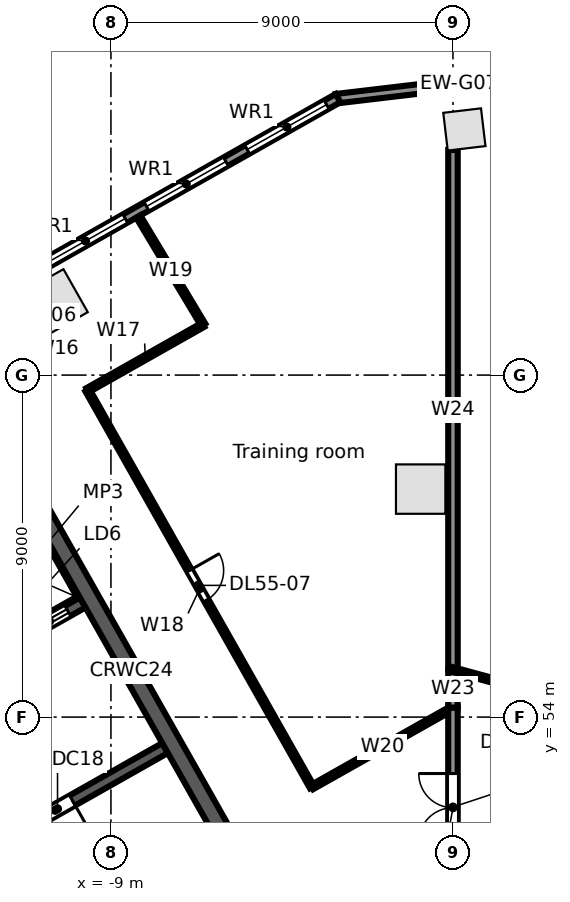
"""IFC4 building model, lengths in metres.
Left out: names, types, materials, properties, quantities, classifications, styles, units other than length and angle.
Written with IfcOpenShell. Run it as: python <this file> out.ifc"""

import sys

from ifc_helpers import new_model, si_unit, direction, frame, frame_2d, origin, origin_2d, place, context, subcontext, project, spatial, rectangle, extrude, element, fill, save


model = new_model("IFC4")
c1 = context("Model", 3, precision=1e-05, world=origin(), true_north=direction((0.0, 1.0)))
c2 = subcontext(c1, "Body", "Model", "MODEL_VIEW")
j1 = project(units=[si_unit("LENGTHUNIT", "METRE"), si_unit("PLANEANGLEUNIT", "RADIAN")], contexts=[c1])
p1 = place(None, origin())
s1 = spatial("IfcSite", under=j1, at=p1, CompositionType="ELEMENT")
p2 = place(p1, origin())
s2 = spatial("IfcBuilding", under=s1, at=p2, CompositionType="ELEMENT")
p3 = place(p2, frame((0.0, 0.0, 254.3)))
s3 = spatial("IfcBuildingStorey", under=s2, at=p3, CompositionType="ELEMENT", Elevation=254.3)
p4 = place(p3, frame((0.3, 69.464, 0.0), z_axis=(0.0, 0.0, 1.0), x_axis=(-0.993068456955, -0.117537397458, 0.0)))
e1 = element("IfcColumn", 1, at=p4, inside=s3, PredefinedType="COLUMN", context=c2, shape_type="SweptSolid", body=[
    extrude(rectangle(XDim=1.0, YDim=1.0, at=origin_2d()), origin(), (0.0, 0.0, 1.0), 3.9),
])
for number, where, z_axis, x_axis in (
    (2, (-10.495, 64.902, 0.0), (0.0, 0.0, 1.0), (-0.87, -0.492, 0.0)),
    (3, (-0.85, 60.0, 0.0), (0.0, 0.0, 1.0), (0.0, 1.0, 0.0)),
):
    element("IfcColumn", number, at=place(p3, frame(where, z_axis=z_axis, x_axis=x_axis)), inside=s3, PredefinedType="COLUMN", context=c2, shape_type="SweptSolid", body=[
        extrude(rectangle(XDim=1.3, YDim=1.3, at=origin_2d()), origin(), (0.0, 0.0, 1.0), 3.9),
    ])
p5 = place(p3, frame((-3.071, 70.273, 0.0), z_axis=(0.0, 0.0, 1.0), x_axis=(0.993064524962, 0.11757061394, 0.0)))
e4 = element("IfcWall", 4, at=p5, inside=s3, PredefinedType="STANDARD", context=c2, shape_type="SweptSolid", body=[
    extrude(rectangle(XDim=6.506, YDim=0.25, at=frame_2d((3.253, 0.0))), origin(), (0.0, 0.0, 1.0), 3.55),
])
p6 = place(p3, frame((-58.732, 38.771, 0.0), z_axis=(0.0, 0.0, 1.0), x_axis=(0.870354824205, 0.492425100887, 0.0)))
e5 = element("IfcWall", 5, at=p6, inside=s3, PredefinedType="STANDARD", context=c2, shape_type="SweptSolid", body=[
    extrude(rectangle(XDim=64.006, YDim=0.25, at=frame_2d((32.003, 0.0))), origin(), (0.0, 0.0, 1.0), 3.55),
])
p7 = place(p6, frame((61.259, 0.0, 0.8)))
e6 = element("IfcOpeningElement", 6, at=p7, cuts=e5, PredefinedType="OPENING", context=c2, shape_type="SweptSolid", body=[
    extrude(rectangle(XDim=2.4, YDim=2.2, at=frame_2d((1.2, 1.1))), frame((0.0, 0.135, 0.0), z_axis=(0.0, -1.0, 0.0), x_axis=(1.0, 0.0, 0.0)), (0.0, 0.0, 1.0), 0.27),
])
p8 = place(p6, frame((58.216, 0.0, 0.8)))
e7 = element("IfcOpeningElement", 7, at=p8, cuts=e5, PredefinedType="OPENING", context=c2, shape_type="SweptSolid", body=[
    extrude(rectangle(XDim=2.4, YDim=2.2, at=frame_2d((1.2, 1.1))), frame((0.0, 0.135, 0.0), z_axis=(0.0, -1.0, 0.0), x_axis=(1.0, 0.0, 0.0)), (0.0, 0.0, 1.0), 0.27),
])
p9 = place(p6, frame((55.173, 0.0, 0.8)))
e8 = element("IfcOpeningElement", 8, at=p9, cuts=e5, PredefinedType="OPENING", context=c2, shape_type="SweptSolid", body=[
    extrude(rectangle(XDim=2.4, YDim=2.2, at=frame_2d((1.2, 1.1))), frame((0.0, 0.135, 0.0), z_axis=(0.0, -1.0, 0.0), x_axis=(1.0, 0.0, 0.0)), (0.0, 0.0, 1.0), 0.27),
])
p10 = place(p6, frame((52.129, 0.0, 0.8)))
e9 = element("IfcOpeningElement", 9, at=p10, cuts=e5, PredefinedType="OPENING", context=c2, shape_type="SweptSolid", body=[
    extrude(rectangle(XDim=2.4, YDim=2.2, at=frame_2d((1.2, 1.1))), frame((0.0, 0.135, 0.0), z_axis=(0.0, -1.0, 0.0), x_axis=(1.0, 0.0, 0.0)), (0.0, 0.0, 1.0), 0.27),
])
p11 = place(p6, frame((49.086, 0.0, 0.8)))
e10 = element("IfcOpeningElement", 10, at=p11, cuts=e5, PredefinedType="OPENING", context=c2, shape_type="SweptSolid", body=[
    extrude(rectangle(XDim=2.4, YDim=2.2, at=frame_2d((1.2, 1.1))), frame((0.0, 0.135, 0.0), z_axis=(0.0, -1.0, 0.0), x_axis=(1.0, 0.0, 0.0)), (0.0, 0.0, 1.0), 0.27),
])
p12 = place(p6, frame((46.043, 0.0, 0.8)))
e11 = element("IfcOpeningElement", 11, at=p12, cuts=e5, PredefinedType="OPENING", context=c2, shape_type="SweptSolid", body=[
    extrude(rectangle(XDim=2.4, YDim=2.2, at=frame_2d((1.2, 1.1))), frame((0.0, 0.135, 0.0), z_axis=(0.0, -1.0, 0.0), x_axis=(1.0, 0.0, 0.0)), (0.0, 0.0, 1.0), 0.27),
])
p13 = place(p6, frame((43.0, 0.0, 0.8)))
e12 = element("IfcOpeningElement", 12, at=p13, cuts=e5, PredefinedType="OPENING", context=c2, shape_type="SweptSolid", body=[
    extrude(rectangle(XDim=2.4, YDim=2.2, at=frame_2d((1.2, 1.1))), frame((0.0, 0.135, 0.0), z_axis=(0.0, -1.0, 0.0), x_axis=(1.0, 0.0, 0.0)), (0.0, 0.0, 1.0), 0.27),
])
p14 = place(p6, frame((39.956, 0.0, 0.8)))
e13 = element("IfcOpeningElement", 13, at=p14, cuts=e5, PredefinedType="OPENING", context=c2, shape_type="SweptSolid", body=[
    extrude(rectangle(XDim=2.4, YDim=2.2, at=frame_2d((1.2, 1.1))), frame((0.0, 0.135, 0.0), z_axis=(0.0, -1.0, 0.0), x_axis=(1.0, 0.0, 0.0)), (0.0, 0.0, 1.0), 0.27),
])
p15 = place(p6, frame((36.913, 0.0, 0.8)))
e14 = element("IfcOpeningElement", 14, at=p15, cuts=e5, PredefinedType="OPENING", context=c2, shape_type="SweptSolid", body=[
    extrude(rectangle(XDim=2.4, YDim=2.2, at=frame_2d((1.2, 1.1))), frame((0.0, 0.135, 0.0), z_axis=(0.0, -1.0, 0.0), x_axis=(1.0, 0.0, 0.0)), (0.0, 0.0, 1.0), 0.27),
])
p16 = place(p6, frame((33.87, 0.0, 0.8)))
e15 = element("IfcOpeningElement", 15, at=p16, cuts=e5, PredefinedType="OPENING", context=c2, shape_type="SweptSolid", body=[
    extrude(rectangle(XDim=2.4, YDim=2.2, at=frame_2d((1.2, 1.1))), frame((0.0, 0.135, 0.0), z_axis=(0.0, -1.0, 0.0), x_axis=(1.0, 0.0, 0.0)), (0.0, 0.0, 1.0), 0.27),
])
p17 = place(p6, frame((30.826, 0.0, 0.8)))
e16 = element("IfcOpeningElement", 16, at=p17, cuts=e5, PredefinedType="OPENING", context=c2, shape_type="SweptSolid", body=[
    extrude(rectangle(XDim=2.4, YDim=2.2, at=frame_2d((1.2, 1.1))), frame((0.0, 0.135, 0.0), z_axis=(0.0, -1.0, 0.0), x_axis=(1.0, 0.0, 0.0)), (0.0, 0.0, 1.0), 0.27),
])
p18 = place(p6, frame((27.783, 0.0, 0.8)))
e17 = element("IfcOpeningElement", 17, at=p18, cuts=e5, PredefinedType="OPENING", context=c2, shape_type="SweptSolid", body=[
    extrude(rectangle(XDim=2.4, YDim=2.2, at=frame_2d((1.2, 1.1))), frame((0.0, 0.135, 0.0), z_axis=(0.0, -1.0, 0.0), x_axis=(1.0, 0.0, 0.0)), (0.0, 0.0, 1.0), 0.27),
])
p19 = place(p6, frame((24.74, 0.0, 0.8)))
e18 = element("IfcOpeningElement", 18, at=p19, cuts=e5, PredefinedType="OPENING", context=c2, shape_type="SweptSolid", body=[
    extrude(rectangle(XDim=2.4, YDim=2.2, at=frame_2d((1.2, 1.1))), frame((0.0, 0.135, 0.0), z_axis=(0.0, -1.0, 0.0), x_axis=(1.0, 0.0, 0.0)), (0.0, 0.0, 1.0), 0.27),
])
p20 = place(p6, frame((21.696, 0.0, 0.8)))
e19 = element("IfcOpeningElement", 19, at=p20, cuts=e5, PredefinedType="OPENING", context=c2, shape_type="SweptSolid", body=[
    extrude(rectangle(XDim=2.4, YDim=2.2, at=frame_2d((1.2, 1.1))), frame((0.0, 0.135, 0.0), z_axis=(0.0, -1.0, 0.0), x_axis=(1.0, 0.0, 0.0)), (0.0, 0.0, 1.0), 0.27),
])
p21 = place(p6, frame((18.653, 0.0, 0.8)))
e20 = element("IfcOpeningElement", 20, at=p21, cuts=e5, PredefinedType="OPENING", context=c2, shape_type="SweptSolid", body=[
    extrude(rectangle(XDim=2.4, YDim=2.2, at=frame_2d((1.2, 1.1))), frame((0.0, 0.135, 0.0), z_axis=(0.0, -1.0, 0.0), x_axis=(1.0, 0.0, 0.0)), (0.0, 0.0, 1.0), 0.27),
])
p22 = place(p6, frame((15.61, 0.0, 0.8)))
e21 = element("IfcOpeningElement", 21, at=p22, cuts=e5, PredefinedType="OPENING", context=c2, shape_type="SweptSolid", body=[
    extrude(rectangle(XDim=2.4, YDim=2.2, at=frame_2d((1.2, 1.1))), frame((0.0, 0.135, 0.0), z_axis=(0.0, -1.0, 0.0), x_axis=(1.0, 0.0, 0.0)), (0.0, 0.0, 1.0), 0.27),
])
p23 = place(p6, frame((12.567, 0.0, 0.8)))
e22 = element("IfcOpeningElement", 22, at=p23, cuts=e5, PredefinedType="OPENING", context=c2, shape_type="SweptSolid", body=[
    extrude(rectangle(XDim=2.4, YDim=2.2, at=frame_2d((1.2, 1.1))), frame((0.0, 0.135, 0.0), z_axis=(0.0, -1.0, 0.0), x_axis=(1.0, 0.0, 0.0)), (0.0, 0.0, 1.0), 0.27),
])
p24 = place(p6, frame((9.523, 0.0, 0.8)))
e23 = element("IfcOpeningElement", 23, at=p24, cuts=e5, PredefinedType="OPENING", context=c2, shape_type="SweptSolid", body=[
    extrude(rectangle(XDim=2.4, YDim=2.2, at=frame_2d((1.2, 1.1))), frame((0.0, 0.135, 0.0), z_axis=(0.0, -1.0, 0.0), x_axis=(1.0, 0.0, 0.0)), (0.0, 0.0, 1.0), 0.27),
])
p25 = place(p6, frame((6.48, 0.0, 0.8)))
e24 = element("IfcOpeningElement", 24, at=p25, cuts=e5, PredefinedType="OPENING", context=c2, shape_type="SweptSolid", body=[
    extrude(rectangle(XDim=2.4, YDim=2.2, at=frame_2d((1.2, 1.1))), frame((0.0, 0.135, 0.0), z_axis=(0.0, -1.0, 0.0), x_axis=(1.0, 0.0, 0.0)), (0.0, 0.0, 1.0), 0.27),
])
p26 = place(p6, frame((3.437, 0.0, 0.8)))
e25 = element("IfcOpeningElement", 25, at=p26, cuts=e5, PredefinedType="OPENING", context=c2, shape_type="SweptSolid", body=[
    extrude(rectangle(XDim=2.4, YDim=2.2, at=frame_2d((1.2, 1.1))), frame((0.0, 0.135, 0.0), z_axis=(0.0, -1.0, 0.0), x_axis=(1.0, 0.0, 0.0)), (0.0, 0.0, 1.0), 0.27),
])
p27 = place(p6, frame((0.393, 0.0, 0.8)))
e26 = element("IfcOpeningElement", 26, at=p27, cuts=e5, PredefinedType="OPENING", context=c2, shape_type="SweptSolid", body=[
    extrude(rectangle(XDim=2.4, YDim=2.2, at=frame_2d((1.2, 1.1))), frame((0.0, 0.135, 0.0), z_axis=(0.0, -1.0, 0.0), x_axis=(1.0, 0.0, 0.0)), (0.0, 0.0, 1.0), 0.27),
])
p28 = place(p3, frame((-13.365, 49.911, 0.0), z_axis=(0.0, 0.0, 1.0), x_axis=(0.870352159619, 0.492429810477, 0.0)))
e27 = element("IfcWall", 27, at=p28, inside=s3, PredefinedType="SOLIDWALL", context=c2, shape_type="SweptSolid", body=[
    extrude(rectangle(XDim=6.65, YDim=0.3, at=frame_2d((3.325, 0.0))), origin(), (0.0, 0.0, 1.0), 3.55),
])
p29 = place(p28, frame((2.95, 0.0, 0.0)))
e28 = element("IfcOpeningElement", 28, at=p29, cuts=e27, PredefinedType="OPENING", context=c2, shape_type="SweptSolid", body=[
    extrude(rectangle(XDim=0.9, YDim=2.1, at=frame_2d((0.45, 1.05))), frame((0.0, 0.16, 0.0), z_axis=(0.0, -1.0, 0.0), x_axis=(1.0, 0.0, 0.0)), (0.0, 0.0, 1.0), 0.32),
])
p30 = place(p3, frame((-15.618, 53.691, 0.0), z_axis=(0.0, 0.0, 1.0), x_axis=(0.870358646884, 0.492418344291, 0.0)))
e29 = element("IfcWall", 29, at=p30, inside=s3, PredefinedType="SOLIDWALL", context=c2, shape_type="SweptSolid", body=[
    extrude(rectangle(XDim=6.75, YDim=0.3, at=frame_2d((3.375, 0.0))), origin(), (0.0, 0.0, 1.0), 3.55),
])
p31 = place(p30, frame((0.6, 0.0, 0.0)))
e30 = element("IfcOpeningElement", 30, at=p31, cuts=e29, PredefinedType="OPENING", context=c2, shape_type="SweptSolid", body=[
    extrude(rectangle(XDim=1.1, YDim=2.1, at=frame_2d((0.55, 1.05))), frame((0.0, 0.16, 0.0), z_axis=(0.0, -1.0, 0.0), x_axis=(1.0, 0.0, 0.0)), (0.0, 0.0, 1.0), 0.32),
])
p32 = place(p30, frame((2.9, 0.0, 0.0)))
e31 = element("IfcOpeningElement", 31, at=p32, cuts=e29, PredefinedType="OPENING", context=c2, shape_type="SweptSolid", body=[
    extrude(rectangle(XDim=1.1, YDim=2.1, at=frame_2d((0.55, 1.05))), frame((0.0, 0.16, 0.0), z_axis=(0.0, -1.0, 0.0), x_axis=(1.0, 0.0, 0.0)), (0.0, 0.0, 1.0), 0.32),
])
p33 = place(p30, frame((5.2, 0.0, 0.0)))
e32 = element("IfcOpeningElement", 32, at=p33, cuts=e29, PredefinedType="OPENING", context=c2, shape_type="SweptSolid", body=[
    extrude(rectangle(XDim=1.1, YDim=2.1, at=frame_2d((0.55, 1.05))), frame((0.0, 0.16, 0.0), z_axis=(0.0, -1.0, 0.0), x_axis=(1.0, 0.0, 0.0)), (0.0, 0.0, 1.0), 0.32),
])
p34 = place(p3, frame((-11.689, 60.912, 0.0), z_axis=(0.0, 0.0, 1.0), x_axis=(0.492421378713, -0.870356930107, 0.0)))
e33 = element("IfcWall", 33, at=p34, inside=s3, PredefinedType="SOLIDWALL", context=c2, shape_type="SweptSolid", body=[
    extrude(rectangle(XDim=13.1, YDim=0.45, at=frame_2d((6.55, 0.0))), origin(), (0.0, 0.0, 1.0), 3.55),
])
p35 = place(p3, frame((-9.618, 62.601, 0.0), z_axis=(0.0, 0.0, 1.0), x_axis=(0.870402970255, 0.492339993675, 0.0)))
e34 = element("IfcWall", 34, at=p35, inside=s3, PredefinedType="PARTITIONING", context=c2, shape_type="SweptSolid", body=[
    extrude(rectangle(XDim=3.5, YDim=0.125, at=frame_2d((1.75, 0.0))), origin(), (0.0, 0.0, 1.0), 2.722),
])
p36 = place(p3, frame((-9.618, 62.601, 0.0), z_axis=(0.0, 0.0, 1.0), x_axis=(0.492420575123, -0.870357384754, 0.0)))
e35 = element("IfcWall", 35, at=p36, inside=s3, PredefinedType="PARTITIONING", context=c2, shape_type="SweptSolid", body=[
    extrude(rectangle(XDim=12.0, YDim=0.125, at=frame_2d((6.0, 0.0))), origin(), (0.0, 0.0, 1.0), 2.722),
])
p37 = place(p36, frame((5.45, 0.0, 0.0)))
e36 = element("IfcOpeningElement", 36, at=p37, cuts=e35, PredefinedType="OPENING", context=c2, shape_type="SweptSolid", body=[
    extrude(rectangle(XDim=0.9, YDim=2.1, at=frame_2d((0.45, 1.05))), frame((0.0, 0.073, 0.0), z_axis=(0.0, -1.0, 0.0), x_axis=(1.0, 0.0, 0.0)), (0.0, 0.0, 1.0), 0.145),
])
p38 = place(p3, frame((-8.28, 67.172, 0.0), z_axis=(0.0, 0.0, 1.0), x_axis=(0.514301147355, -0.857609660527, 0.0)))
e37 = element("IfcWall", 37, at=p38, inside=s3, PredefinedType="PARTITIONING", context=c2, shape_type="SweptSolid", body=[
    extrude(rectangle(XDim=3.321, YDim=0.125, at=frame_2d((1.661, 0.0))), origin(), (0.0, 0.0, 1.0), 2.73),
])
p39 = place(p3, frame((-3.709, 52.157, 0.0), z_axis=(0.0, 0.0, 1.0), x_axis=(0.870901087888, 0.491458335075, 0.0)))
e38 = element("IfcWall", 38, at=p39, inside=s3, PredefinedType="PARTITIONING", context=c2, shape_type="SweptSolid", body=[
    extrude(rectangle(XDim=4.259, YDim=0.125, at=frame_2d((2.129, 0.0))), origin(), (0.0, 0.0, 1.0), 2.722),
])
p40 = place(p3, frame((0.0, 49.015, 0.0), z_axis=(0.0, 0.0, 1.0), x_axis=(0.0, 1.0, 0.0)))
e39 = element("IfcWall", 39, at=p40, inside=s3, PredefinedType="PARTITIONING", context=c2, shape_type="SweptSolid", body=[
    extrude(rectangle(XDim=5.235, YDim=0.25, at=frame_2d((2.618, 0.0))), origin(), (0.0, 0.0, 1.0), 2.73),
])
p41 = place(p40, frame((1.7, 0.0, 0.0)))
e40 = element("IfcOpeningElement", 40, at=p41, cuts=e39, PredefinedType="OPENING", context=c2, shape_type="SweptSolid", body=[
    extrude(rectangle(XDim=1.8, YDim=2.1, at=frame_2d((0.9, 1.05))), frame((0.0, 0.135, 0.0), z_axis=(0.0, -1.0, 0.0), x_axis=(1.0, 0.0, 0.0)), (0.0, 0.0, 1.0), 0.27),
])
p42 = place(p3, frame((0.0, 54.25, 0.0), z_axis=(0.0, 0.0, 1.0), x_axis=(0.0, 1.0, 0.0)))
e41 = element("IfcWall", 41, at=p42, inside=s3, PredefinedType="PARTITIONING", context=c2, shape_type="SweptSolid", body=[
    extrude(rectangle(XDim=1.0, YDim=0.25, at=frame_2d((0.5, 0.0))), origin(), (0.0, 0.0, 1.0), 3.55),
])
p43 = place(p3, frame((0.0, 55.25, 0.0), z_axis=(0.0, 0.0, 1.0), x_axis=(0.0, 1.0, 0.0)))
e42 = element("IfcWall", 42, at=p43, inside=s3, PredefinedType="PARTITIONING", context=c2, shape_type="SweptSolid", body=[
    extrude(rectangle(XDim=13.675, YDim=0.25, at=frame_2d((6.837, 0.0))), origin(), (0.0, 0.0, 1.0), 2.618),
])
p44 = place(p3, frame((0.0, 55.25, 0.0), z_axis=(0.0, 0.0, 1.0), x_axis=(0.965016778836, -0.262188132005, 0.0)))
e43 = element("IfcWall", 43, at=p44, inside=s3, PredefinedType="PARTITIONING", context=c2, shape_type="SweptSolid", body=[
    extrude(rectangle(XDim=4.691, YDim=0.125, at=frame_2d((2.346, 0.0))), origin(), (0.0, 0.0, 1.0), 3.55),
])
p45 = place(p44, frame((1.95, 0.0, 0.0)))
e44 = element("IfcOpeningElement", 44, at=p45, cuts=e43, PredefinedType="OPENING", context=c2, shape_type="SweptSolid", body=[
    extrude(rectangle(XDim=0.9, YDim=2.1, at=frame_2d((0.45, 1.05))), frame((0.0, 0.073, 0.0), z_axis=(0.0, -1.0, 0.0), x_axis=(1.0, 0.0, 0.0)), (0.0, 0.0, 1.0), 0.145),
])
p46 = place(p7, origin())
e45 = element("IfcWindow", 45, at=p46, inside=s3, PartitioningType="SINGLE_PANEL", PredefinedType="WINDOW", context=c2, shape_type="SweptSolid", body=[
    extrude(rectangle(XDim=2.4, YDim=2.2, at=frame_2d((1.2, 1.1))), frame((0.0, 0.03, 0.0), z_axis=(0.0, -1.0, 0.0), x_axis=(1.0, 0.0, 0.0)), (0.0, 0.0, 1.0), 0.06),
])
fill(e6, e45)
p47 = place(p8, origin())
e46 = element("IfcWindow", 46, at=p47, inside=s3, PartitioningType="SINGLE_PANEL", PredefinedType="WINDOW", context=c2, shape_type="SweptSolid", body=[
    extrude(rectangle(XDim=2.4, YDim=2.2, at=frame_2d((1.2, 1.1))), frame((0.0, 0.03, 0.0), z_axis=(0.0, -1.0, 0.0), x_axis=(1.0, 0.0, 0.0)), (0.0, 0.0, 1.0), 0.06),
])
fill(e7, e46)
p48 = place(p9, origin())
e47 = element("IfcWindow", 47, at=p48, inside=s3, PartitioningType="SINGLE_PANEL", PredefinedType="WINDOW", context=c2, shape_type="SweptSolid", body=[
    extrude(rectangle(XDim=2.4, YDim=2.2, at=frame_2d((1.2, 1.1))), frame((0.0, 0.03, 0.0), z_axis=(0.0, -1.0, 0.0), x_axis=(1.0, 0.0, 0.0)), (0.0, 0.0, 1.0), 0.06),
])
fill(e8, e47)
p49 = place(p33, origin())
e48 = element("IfcDoor", 48, at=p49, inside=s3, OperationType="DOUBLE_DOOR_SLIDING", PredefinedType="DOOR", context=c2, shape_type="SweptSolid", body=[
    extrude(rectangle(XDim=1.1, YDim=2.1, at=frame_2d((0.55, 1.05))), frame((0.0, 0.025, 0.0), z_axis=(0.0, -1.0, 0.0), x_axis=(1.0, 0.0, 0.0)), (0.0, 0.0, 1.0), 0.05),
])
fill(e32, e48)
p50 = place(p29, frame((0.9, 0.0, 0.0), z_axis=(0.0, 0.0, 1.0), x_axis=(-1.0, 0.0, 0.0)))
e49 = element("IfcDoor", 49, at=p50, inside=s3, OperationType="SINGLE_SWING_LEFT", PredefinedType="DOOR", context=c2, shape_type="SweptSolid", body=[
    extrude(rectangle(XDim=0.9, YDim=2.1, at=frame_2d((0.45, 1.05))), frame((0.0, 0.025, 0.0), z_axis=(0.0, -1.0, 0.0), x_axis=(1.0, 0.0, 0.0)), (0.0, 0.0, 1.0), 0.05),
])
fill(e28, e49)
p51 = place(p37, origin())
e50 = element("IfcDoor", 50, at=p51, inside=s3, OperationType="SINGLE_SWING_LEFT", PredefinedType="DOOR", context=c2, shape_type="SweptSolid", body=[
    extrude(rectangle(XDim=0.9, YDim=2.1, at=frame_2d((0.45, 1.05))), frame((0.0, 0.025, 0.0), z_axis=(0.0, -1.0, 0.0), x_axis=(1.0, 0.0, 0.0)), (0.0, 0.0, 1.0), 0.05),
])
fill(e36, e50)
p52 = place(p41, origin())
e51 = element("IfcDoor", 51, at=p52, inside=s3, OperationType="DOUBLE_DOOR_SINGLE_SWING", PredefinedType="DOOR", context=c2, shape_type="SweptSolid", body=[
    extrude(rectangle(XDim=1.8, YDim=2.1, at=frame_2d((0.9, 1.05))), frame((0.0, 0.025, 0.0), z_axis=(0.0, -1.0, 0.0), x_axis=(1.0, 0.0, 0.0)), (0.0, 0.0, 1.0), 0.05),
])
fill(e40, e51)
save(model, sys.argv[1])
